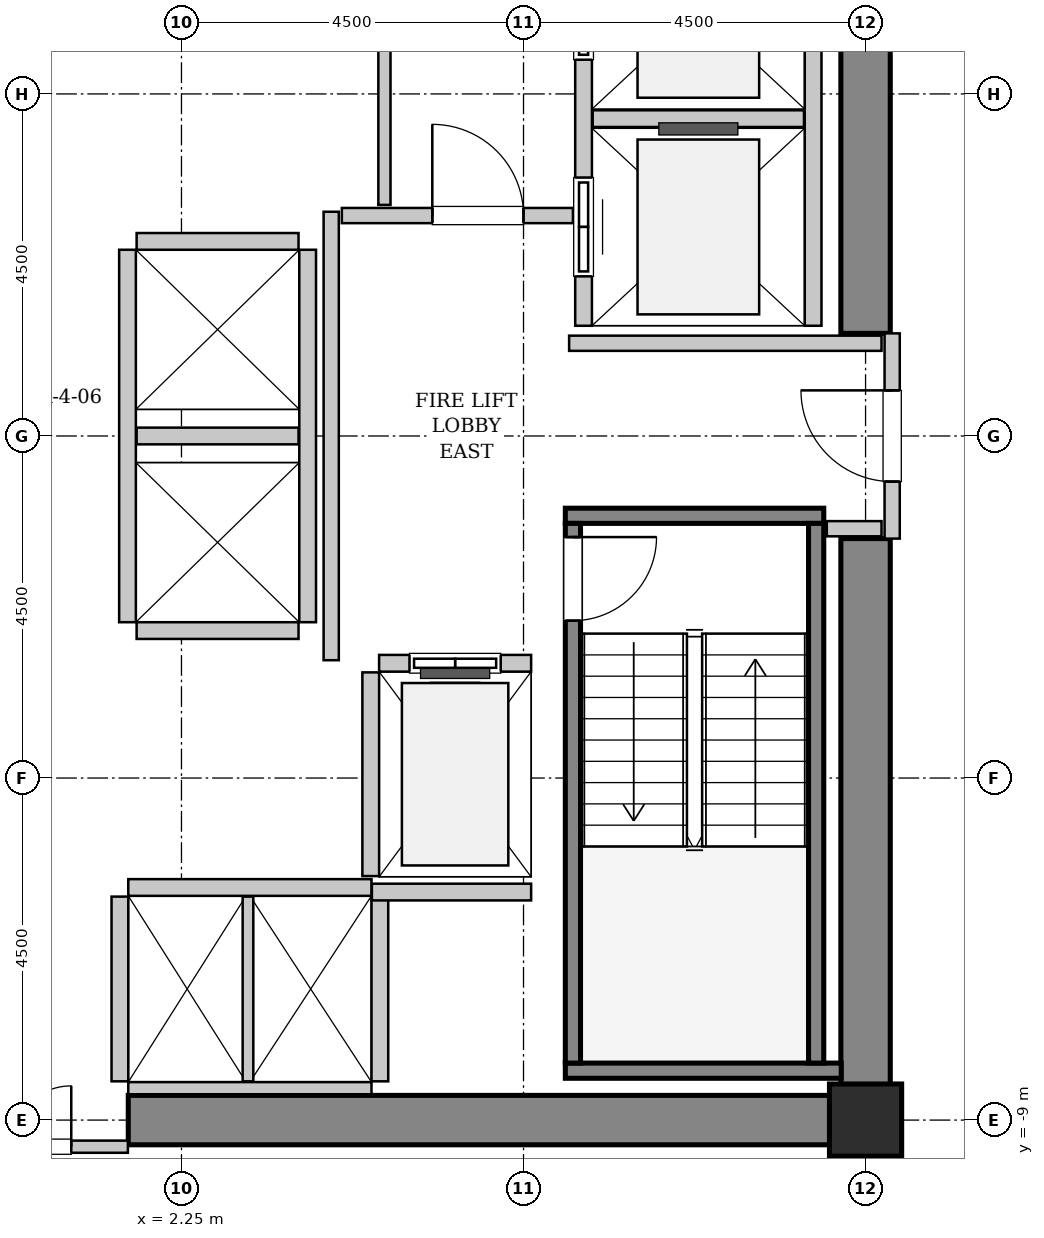
"""IFC4 building model, lengths in metres.
Left out: names, types, materials, properties, quantities, classifications, styles, units other than length and angle.
Written with IfcOpenShell. Run it as: python <this file> out.ifc"""

import sys

from ifc_helpers import new_model, si_unit, direction, frame, frame_2d, origin, origin_2d, place, context, subcontext, project, spatial, rectangle, hollow_rectangle, extrude, source, transform, mapped, element, fill, save


model = new_model("IFC4")
c1 = context("Model", 3, precision=1e-05, world=origin(), true_north=direction((0.0, 1.0)))
c2 = subcontext(c1, "Body", "Model", "MODEL_VIEW")
j1 = project(units=[si_unit("LENGTHUNIT", "METRE"), si_unit("PLANEANGLEUNIT", "RADIAN")], contexts=[c1])
p1 = place(None, origin())
s1 = spatial("IfcSite", under=j1, at=p1, CompositionType="ELEMENT")
p2 = place(p1, origin())
s2 = spatial("IfcBuilding", under=s1, at=p2, CompositionType="ELEMENT")
p3 = place(p2, frame((0.0, 0.0, 33.0)))
s3 = spatial("IfcBuildingStorey", under=s2, at=p3, CompositionType="ELEMENT", Elevation=33.0)
m1 = source(origin(), c2, "Body", "SweptSolid", [
    extrude(rectangle(XDim=10.025, YDim=0.65, at=frame_2d((5.012, 0.0))), origin(), (0.0, 0.0, 1.0), 3.8),
])
p4 = place(p3, frame((1.55, -9.0, 0.0), z_axis=(0.0, 0.0, 1.0), x_axis=(1.0, 0.0, 0.0)))
e1 = element("IfcWall", 1, at=p4, inside=s3, PredefinedType="SHEAR", context=c2, shape_type="MappedRepresentation", body=[
    mapped(m1, transform((0.0, 0.0, 0.0), x_axis=(1.0, 0.0, 0.0), y_axis=(0.0, 1.0, 0.0), z_axis=(0.0, 0.0, 1.0), scale=1.0)),
])
m2 = source(origin(), c2, "Body", "SweptSolid", [
    extrude(rectangle(XDim=7.325, YDim=0.65, at=frame_2d((3.663, 0.0))), origin(), (0.0, 0.0, 1.0), 3.8),
])
for number, where, z_axis, x_axis in (
    (2, (11.25, -8.675, 0.0), (0.0, 0.0, 1.0), (0.0, 1.0, 0.0)),
    (3, (11.25, 1.35, 0.0), (0.0, 0.0, 1.0), (0.0, 1.0, 0.0)),
):
    element("IfcWall", number, at=place(p3, frame(where, z_axis=z_axis, x_axis=x_axis)), inside=s3, PredefinedType="SHEAR", context=c2, shape_type="MappedRepresentation", body=[
        mapped(m2, transform((0.0, 0.0, 0.0), x_axis=(1.0, 0.0, 0.0), y_axis=(0.0, 1.0, 0.0), z_axis=(0.0, 0.0, 1.0), scale=1.0)),
    ])
m3 = source(origin(), c2, "Body", "SweptSolid", [
    extrude(hollow_rectangle(XDim=0.95, YDim=0.95, WallThickness=0.045, InnerFilletRadius=0.045, OuterFilletRadius=0.09, at=origin_2d()), origin(), (0.0, 0.0, 1.0), 3.8),
])
p5 = place(p3, frame((11.25, -9.0, 0.0), z_axis=(0.0, 0.0, 1.0), x_axis=(1.0, 0.0, 0.0)))
e4 = element("IfcColumn", 4, at=p5, inside=s3, PredefinedType="COLUMN", context=c2, shape_type="MappedRepresentation", body=[
    mapped(m3, transform((0.0, 0.0, 0.0), x_axis=(1.0, 0.0, 0.0), y_axis=(0.0, 1.0, 0.0), z_axis=(0.0, 0.0, 1.0), scale=1.0)),
])
m4 = source(origin(), c2, "Body", "SweptSolid", [
    extrude(rectangle(XDim=3.4, YDim=0.2, at=frame_2d((1.7, 0.0))), origin(), (0.0, 0.0, 1.0), 3.8),
])
p6 = place(p3, frame((7.3, -1.05, 0.0), z_axis=(0.0, 0.0, 1.0), x_axis=(1.0, 0.0, 0.0)))
e5 = element("IfcWall", 5, at=p6, inside=s3, PredefinedType="SOLIDWALL", context=c2, shape_type="MappedRepresentation", body=[
    mapped(m4, transform((0.0, 0.0, 0.0), x_axis=(1.0, 0.0, 0.0), y_axis=(0.0, 1.0, 0.0), z_axis=(0.0, 0.0, 1.0), scale=1.0)),
])
m5 = source(origin(), c2, "Body", "SweptSolid", [
    extrude(rectangle(XDim=3.63, YDim=0.2, at=frame_2d((1.815, 0.0))), origin(), (0.0, 0.0, 1.0), 3.8),
])
p7 = place(p3, frame((7.3, -8.35, 0.0), z_axis=(0.0, 0.0, 1.0), x_axis=(1.0, 0.0, 0.0)))
e6 = element("IfcWall", 6, at=p7, inside=s3, PredefinedType="SOLIDWALL", context=c2, shape_type="MappedRepresentation", body=[
    mapped(m5, transform((0.0, 0.0, 0.0), x_axis=(1.0, 0.0, 0.0), y_axis=(0.0, 1.0, 0.0), z_axis=(0.0, 0.0, 1.0), scale=1.0)),
])
m6 = source(origin(), c2, "Body", "SweptSolid", [
    extrude(rectangle(XDim=7.1, YDim=0.2, at=frame_2d((3.55, 0.0))), origin(), (0.0, 0.0, 1.0), 3.8),
])
p8 = place(p3, frame((7.4, -1.15, 0.0), z_axis=(0.0, 0.0, 1.0), x_axis=(0.0, -1.0, 0.0)))
e7 = element("IfcWall", 7, at=p8, inside=s3, PredefinedType="SOLIDWALL", context=c2, shape_type="MappedRepresentation", body=[
    mapped(m6, transform((0.0, 0.0, 0.0), x_axis=(1.0, 0.0, 0.0), y_axis=(0.0, 1.0, 0.0), z_axis=(0.0, 0.0, 1.0), scale=1.0)),
])
p9 = place(p8, frame((0.18, 0.0, 0.0)))
e8 = element("IfcOpeningElement", 8, at=p9, cuts=e7, PredefinedType="OPENING", context=c2, shape_type="SweptSolid", body=[
    extrude(rectangle(XDim=1.1, YDim=2.15, at=frame_2d((0.55, 1.075))), frame((0.0, 0.11, 0.0), z_axis=(0.0, -1.0, 0.0), x_axis=(1.0, 0.0, 0.0)), (0.0, 0.0, 1.0), 0.22),
])
p10 = place(p3, frame((10.6, -1.15, 0.0), z_axis=(0.0, 0.0, 1.0), x_axis=(0.0, -1.0, 0.0)))
e9 = element("IfcWall", 9, at=p10, inside=s3, PredefinedType="SOLIDWALL", context=c2, shape_type="MappedRepresentation", body=[
    mapped(m6, transform((0.0, 0.0, 0.0), x_axis=(1.0, 0.0, 0.0), y_axis=(0.0, 1.0, 0.0), z_axis=(0.0, 0.0, 1.0), scale=1.0)),
])
m7 = source(origin(), c2, "Body", "SweptSolid", [
    extrude(rectangle(XDim=2.0, YDim=0.22, at=frame_2d((1.0, 0.0))), origin(), (0.0, 0.0, 1.0), 3.535),
])
p11 = place(p3, frame((6.85, -2.99, 0.0), z_axis=(0.0, 0.0, 1.0), x_axis=(-1.0, 0.0, 0.0)))
e10 = element("IfcWall", 10, at=p11, inside=s3, PredefinedType="SOLIDWALL", context=c2, shape_type="MappedRepresentation", body=[
    mapped(m7, transform((0.0, 0.0, 0.0), x_axis=(1.0, 0.0, 0.0), y_axis=(0.0, 1.0, 0.0), z_axis=(0.0, 0.0, 1.0), scale=1.0)),
])
p12 = place(p11, frame((0.4, 0.0, 0.0)))
e11 = element("IfcOpeningElement", 11, at=p12, cuts=e10, PredefinedType="OPENING", context=c2, shape_type="SweptSolid", body=[
    extrude(rectangle(XDim=1.2, YDim=2.2, at=frame_2d((0.6, 1.1))), frame((0.0, 0.12, 0.0), z_axis=(0.0, -1.0, 0.0), x_axis=(1.0, 0.0, 0.0)), (0.0, 0.0, 1.0), 0.24),
])
m8 = source(origin(), c2, "Body", "SweptSolid", [
    extrude(rectangle(XDim=2.68, YDim=0.22, at=frame_2d((1.34, 0.0))), origin(), (0.0, 0.0, 1.0), 3.535),
])
p13 = place(p3, frame((4.74, -3.11, 0.0), z_axis=(0.0, 0.0, 1.0), x_axis=(0.0, -1.0, 0.0)))
e12 = element("IfcWall", 12, at=p13, inside=s3, PredefinedType="SOLIDWALL", context=c2, shape_type="MappedRepresentation", body=[
    mapped(m8, transform((0.0, 0.0, 0.0), x_axis=(1.0, 0.0, 0.0), y_axis=(0.0, 1.0, 0.0), z_axis=(0.0, 0.0, 1.0), scale=1.0)),
])
m9 = source(origin(), c2, "Body", "SweptSolid", [
    extrude(rectangle(XDim=5.45, YDim=0.22, at=frame_2d((2.725, 0.0))), origin(), (0.0, 0.0, 1.0), 3.535),
])
p14 = place(p3, frame((7.54, 6.9, 0.0), z_axis=(0.0, 0.0, 1.0), x_axis=(0.0, -1.0, 0.0)))
e13 = element("IfcWall", 13, at=p14, inside=s3, PredefinedType="SOLIDWALL", context=c2, shape_type="MappedRepresentation", body=[
    mapped(m9, transform((0.0, 0.0, 0.0), x_axis=(1.0, 0.0, 0.0), y_axis=(0.0, 1.0, 0.0), z_axis=(0.0, 0.0, 1.0), scale=1.0)),
])
p15 = place(p14, frame((3.5, 0.0, 0.0)))
e14 = element("IfcOpeningElement", 14, at=p15, cuts=e13, PredefinedType="OPENING", context=c2, shape_type="SweptSolid", body=[
    extrude(rectangle(XDim=1.3, YDim=2.3, at=frame_2d((0.65, 1.15))), frame((0.0, 0.12, 0.0), z_axis=(0.0, -1.0, 0.0), x_axis=(1.0, 0.0, 0.0)), (0.0, 0.0, 1.0), 0.24),
])
p16 = place(p14, frame((0.65, 0.0, 0.0)))
e15 = element("IfcOpeningElement", 15, at=p16, cuts=e13, PredefinedType="OPENING", context=c2, shape_type="SweptSolid", body=[
    extrude(rectangle(XDim=1.3, YDim=2.3, at=frame_2d((0.65, 1.15))), frame((0.0, 0.12, 0.0), z_axis=(0.0, -1.0, 0.0), x_axis=(1.0, 0.0, 0.0)), (0.0, 0.0, 1.0), 0.24),
])
p17 = place(p3, frame((10.56, 1.45, 0.0), z_axis=(0.0, 0.0, 1.0), x_axis=(0.0, 1.0, 0.0)))
e16 = element("IfcWall", 16, at=p17, inside=s3, PredefinedType="SOLIDWALL", context=c2, shape_type="MappedRepresentation", body=[
    mapped(m9, transform((0.0, 0.0, 0.0), x_axis=(1.0, 0.0, 0.0), y_axis=(0.0, 1.0, 0.0), z_axis=(0.0, 0.0, 1.0), scale=1.0)),
])
m10 = source(origin(), c2, "Body", "SweptSolid", [
    extrude(rectangle(XDim=2.78, YDim=0.22, at=frame_2d((1.39, 0.0))), origin(), (0.0, 0.0, 1.0), 3.535),
])
p18 = place(p3, frame((7.66, 4.175, 0.0), z_axis=(0.0, 0.0, 1.0), x_axis=(1.0, 0.0, 0.0)))
e17 = element("IfcWall", 17, at=p18, inside=s3, PredefinedType="SOLIDWALL", context=c2, shape_type="MappedRepresentation", body=[
    mapped(m10, transform((0.0, 0.0, 0.0), x_axis=(1.0, 0.0, 0.0), y_axis=(0.0, 1.0, 0.0), z_axis=(0.0, 0.0, 1.0), scale=1.0)),
])
m11 = source(origin(), c2, "Body", "SweptSolid", [
    extrude(rectangle(XDim=3.2, YDim=0.22, at=frame_2d((1.6, 0.0))), origin(), (0.0, 0.0, 1.0), 3.535),
])
p19 = place(p3, frame((4.75, -5.94, 0.0), z_axis=(0.0, 0.0, 1.0), x_axis=(-1.0, 0.0, 0.0)))
e18 = element("IfcWall", 18, at=p19, inside=s3, PredefinedType="SOLIDWALL", context=c2, shape_type="MappedRepresentation", body=[
    mapped(m11, transform((0.0, 0.0, 0.0), x_axis=(1.0, 0.0, 0.0), y_axis=(0.0, 1.0, 0.0), z_axis=(0.0, 0.0, 1.0), scale=1.0)),
])
m12 = source(origin(), c2, "Body", "SweptSolid", [
    extrude(rectangle(XDim=3.2, YDim=0.16, at=frame_2d((1.6, 0.0))), origin(), (0.0, 0.0, 1.0), 2.425),
])
p20 = place(p3, frame((1.55, -8.58, 0.0), z_axis=(0.0, 0.0, 1.0), x_axis=(1.0, 0.0, 0.0)))
e19 = element("IfcWall", 19, at=p20, inside=s3, PredefinedType="PARTITIONING", context=c2, shape_type="MappedRepresentation", body=[
    mapped(m12, transform((0.0, 0.0, 0.0), x_axis=(1.0, 0.0, 0.0), y_axis=(0.0, 1.0, 0.0), z_axis=(0.0, 0.0, 1.0), scale=1.0)),
])
m13 = source(origin(), c2, "Body", "SweptSolid", [
    extrude(rectangle(XDim=2.43, YDim=0.22, at=frame_2d((1.215, 0.0))), origin(), (0.0, 0.0, 1.0), 3.535),
])
p21 = place(p3, frame((1.44, -6.06, 0.0), z_axis=(0.0, 0.0, 1.0), x_axis=(0.0, -1.0, 0.0)))
e20 = element("IfcWall", 20, at=p21, inside=s3, PredefinedType="SOLIDWALL", context=c2, shape_type="MappedRepresentation", body=[
    mapped(m13, transform((0.0, 0.0, 0.0), x_axis=(1.0, 0.0, 0.0), y_axis=(0.0, 1.0, 0.0), z_axis=(0.0, 0.0, 1.0), scale=1.0)),
])
m14 = source(origin(), c2, "Body", "SweptSolid", [
    extrude(rectangle(XDim=2.43, YDim=0.14, at=frame_2d((1.215, 0.0))), origin(), (0.0, 0.0, 1.0), 3.535),
])
p22 = place(p3, frame((3.125, -8.49, 0.0), z_axis=(0.0, 0.0, 1.0), x_axis=(0.0, 1.0, 0.0)))
e21 = element("IfcWall", 21, at=p22, inside=s3, PredefinedType="PARTITIONING", context=c2, shape_type="MappedRepresentation", body=[
    mapped(m14, transform((0.0, 0.0, 0.0), x_axis=(1.0, 0.0, 0.0), y_axis=(0.0, 1.0, 0.0), z_axis=(0.0, 0.0, 1.0), scale=1.0)),
])
p23 = place(p3, frame((4.86, -8.49, 0.0), z_axis=(0.0, 0.0, 1.0), x_axis=(0.0, 1.0, 0.0)))
e22 = element("IfcWall", 22, at=p23, inside=s3, PredefinedType="SOLIDWALL", context=c2, shape_type="MappedRepresentation", body=[
    mapped(m13, transform((0.0, 0.0, 0.0), x_axis=(1.0, 0.0, 0.0), y_axis=(0.0, 1.0, 0.0), z_axis=(0.0, 0.0, 1.0), scale=1.0)),
])
m15 = source(origin(), c2, "Body", "SweptSolid", [
    extrude(rectangle(XDim=4.9, YDim=0.22, at=frame_2d((2.45, 0.0))), origin(), (0.0, 0.0, 1.0), 3.535),
])
for number, where, z_axis, x_axis in (
    (23, (1.54, 2.45, 0.0), (0.0, 0.0, 1.0), (0.0, -1.0, 0.0)),
    (24, (3.91, -2.45, 0.0), (0.0, 0.0, 1.0), (0.0, 1.0, 0.0)),
):
    element("IfcWall", number, at=place(p3, frame(where, z_axis=z_axis, x_axis=x_axis)), inside=s3, PredefinedType="SOLIDWALL", context=c2, shape_type="MappedRepresentation", body=[
        mapped(m15, transform((0.0, 0.0, 0.0), x_axis=(1.0, 0.0, 0.0), y_axis=(0.0, 1.0, 0.0), z_axis=(0.0, 0.0, 1.0), scale=1.0)),
    ])
m16 = source(origin(), c2, "Body", "SweptSolid", [
    extrude(rectangle(XDim=2.13, YDim=0.22, at=frame_2d((1.065, 0.0))), origin(), (0.0, 0.0, 1.0), 3.535),
])
for number, where, z_axis, x_axis in (
    (25, (1.66, -2.56, 0.0), (0.0, 0.0, 1.0), (1.0, 0.0, 0.0)),
    (26, (1.66, 0.0, 0.0), (0.0, 0.0, 1.0), (1.0, 0.0, 0.0)),
    (27, (3.79, 2.56, 0.0), (0.0, 0.0, 1.0), (-1.0, 0.0, 0.0)),
):
    element("IfcWall", number, at=place(p3, frame(where, z_axis=z_axis, x_axis=x_axis)), inside=s3, PredefinedType="SOLIDWALL", context=c2, shape_type="MappedRepresentation", body=[
        mapped(m16, transform((0.0, 0.0, 0.0), x_axis=(1.0, 0.0, 0.0), y_axis=(0.0, 1.0, 0.0), z_axis=(0.0, 0.0, 1.0), scale=1.0)),
    ])
m17 = source(origin(), c2, "Body", "SweptSolid", [
    extrude(rectangle(XDim=2.095, YDim=0.22, at=frame_2d((1.048, 0.0))), origin(), (0.0, 0.0, 1.0), 3.535),
])
p24 = place(p3, frame((4.755, -6.0, 0.0), z_axis=(0.0, 0.0, 1.0), x_axis=(1.0, 0.0, 0.0)))
e28 = element("IfcWall", 28, at=p24, inside=s3, PredefinedType="SOLIDWALL", context=c2, shape_type="MappedRepresentation", body=[
    mapped(m17, transform((0.0, 0.0, 0.0), x_axis=(1.0, 0.0, 0.0), y_axis=(0.0, 1.0, 0.0), z_axis=(0.0, 0.0, 1.0), scale=1.0)),
])
m18 = source(origin(), c2, "Body", "SweptSolid", [
    extrude(rectangle(XDim=2.7, YDim=0.2, at=frame_2d((1.35, 0.0))), origin(), (0.0, 0.0, 1.0), 2.425),
])
p25 = place(p3, frame((11.6, -1.35, 0.0), z_axis=(0.0, 0.0, 1.0), x_axis=(0.0, 1.0, 0.0)))
e29 = element("IfcWall", 29, at=p25, inside=s3, PredefinedType="PARTITIONING", context=c2, shape_type="MappedRepresentation", body=[
    mapped(m18, transform((0.0, 0.0, 0.0), x_axis=(1.0, 0.0, 0.0), y_axis=(0.0, 1.0, 0.0), z_axis=(0.0, 0.0, 1.0), scale=1.0)),
])
p26 = place(p25, frame((0.75, 0.0, 0.0)))
e30 = element("IfcOpeningElement", 30, at=p26, cuts=e29, PredefinedType="OPENING", context=c2, shape_type="SweptSolid", body=[
    extrude(rectangle(XDim=1.2, YDim=2.15, at=frame_2d((0.6, 1.075))), frame((0.0, 0.11, 0.0), z_axis=(0.0, -1.0, 0.0), x_axis=(1.0, 0.0, 0.0)), (0.0, 0.0, 1.0), 0.22),
])
m19 = source(origin(), c2, "Body", "SweptSolid", [
    extrude(rectangle(XDim=5.9, YDim=0.2, at=frame_2d((2.95, 0.0))), origin(), (0.0, 0.0, 1.0), 3.535),
])
p27 = place(p3, frame((4.22, -2.95, 0.0), z_axis=(0.0, 0.0, 1.0), x_axis=(0.0, 1.0, 0.0)))
e31 = element("IfcWall", 31, at=p27, inside=s3, PredefinedType="PARTITIONING", context=c2, shape_type="MappedRepresentation", body=[
    mapped(m19, transform((0.0, 0.0, 0.0), x_axis=(1.0, 0.0, 0.0), y_axis=(0.0, 1.0, 0.0), z_axis=(0.0, 0.0, 1.0), scale=1.0)),
])
m20 = source(origin(), c2, "Body", "SweptSolid", [
    extrude(rectangle(XDim=3.04, YDim=0.2, at=frame_2d((1.52, 0.0))), origin(), (0.0, 0.0, 1.0), 3.535),
])
p28 = place(p3, frame((4.36, 2.9, 0.0), z_axis=(0.0, 0.0, 1.0), x_axis=(1.0, 0.0, 0.0)))
e32 = element("IfcWall", 32, at=p28, inside=s3, PredefinedType="PARTITIONING", context=c2, shape_type="MappedRepresentation", body=[
    mapped(m20, transform((0.0, 0.0, 0.0), x_axis=(1.0, 0.0, 0.0), y_axis=(0.0, 1.0, 0.0), z_axis=(0.0, 0.0, 1.0), scale=1.0)),
])
p29 = place(p28, frame((1.19, 0.0, 0.0)))
e33 = element("IfcOpeningElement", 33, at=p29, cuts=e32, PredefinedType="OPENING", context=c2, shape_type="SweptSolid", body=[
    extrude(rectangle(XDim=1.2, YDim=2.15, at=frame_2d((0.6, 1.075))), frame((0.0, 0.11, 0.0), z_axis=(0.0, -1.0, 0.0), x_axis=(1.0, 0.0, 0.0)), (0.0, 0.0, 1.0), 0.22),
])
m21 = source(origin(), c2, "Body", "SweptSolid", [
    extrude(rectangle(XDim=4.11, YDim=0.2, at=frame_2d((2.055, 0.0))), origin(), (0.0, 0.0, 1.0), 3.535),
])
p30 = place(p3, frame((7.35, 1.22, 0.0), z_axis=(0.0, 0.0, 1.0), x_axis=(1.0, 0.0, 0.0)))
e34 = element("IfcWall", 34, at=p30, inside=s3, PredefinedType="PARTITIONING", context=c2, shape_type="MappedRepresentation", body=[
    mapped(m21, transform((0.0, 0.0, 0.0), x_axis=(1.0, 0.0, 0.0), y_axis=(0.0, 1.0, 0.0), z_axis=(0.0, 0.0, 1.0), scale=1.0)),
])
m22 = source(origin(), c2, "Body", "SweptSolid", [
    extrude(rectangle(XDim=0.72, YDim=0.2, at=frame_2d((0.36, 0.0))), origin(), (0.0, 0.0, 1.0), 3.535),
])
p31 = place(p3, frame((10.74, -1.22, 0.0), z_axis=(0.0, 0.0, 1.0), x_axis=(1.0, 0.0, 0.0)))
e35 = element("IfcWall", 35, at=p31, inside=s3, PredefinedType="PARTITIONING", context=c2, shape_type="MappedRepresentation", body=[
    mapped(m22, transform((0.0, 0.0, 0.0), x_axis=(1.0, 0.0, 0.0), y_axis=(0.0, 1.0, 0.0), z_axis=(0.0, 0.0, 1.0), scale=1.0)),
])
m23 = source(origin(), c2, "Body", "SweptSolid", [
    extrude(rectangle(XDim=3.09, YDim=0.16, at=frame_2d((1.545, 0.0))), origin(), (0.0, 0.0, 1.0), 2.425),
])
p32 = place(p3, frame((-1.545, -9.35, 0.0), z_axis=(0.0, 0.0, 1.0), x_axis=(1.0, 0.0, 0.0)))
e36 = element("IfcWall", 36, at=p32, inside=s3, PredefinedType="PARTITIONING", context=c2, shape_type="MappedRepresentation", body=[
    mapped(m23, transform((0.0, 0.0, 0.0), x_axis=(1.0, 0.0, 0.0), y_axis=(0.0, 1.0, 0.0), z_axis=(0.0, 0.0, 1.0), scale=1.0)),
])
p33 = place(p32, frame((0.745, 0.0, 0.0)))
e37 = element("IfcOpeningElement", 37, at=p33, cuts=e36, PredefinedType="OPENING", context=c2, shape_type="SweptSolid", body=[
    extrude(rectangle(XDim=1.6, YDim=2.3, at=frame_2d((0.8, 1.15))), frame((0.0, 0.09, 0.0), z_axis=(0.0, -1.0, 0.0), x_axis=(1.0, 0.0, 0.0)), (0.0, 0.0, 1.0), 0.18),
])
m24 = source(origin(), c2, "Body", "SweptSolid", [
    extrude(rectangle(XDim=3.015, YDim=0.16, at=frame_2d((1.507, 0.0))), origin(), (0.0, 0.0, 1.0), 3.535),
])
p34 = place(p3, frame((4.92, 3.04, 0.0), z_axis=(0.0, 0.0, 1.0), x_axis=(0.0, 1.0, 0.0)))
e38 = element("IfcWall", 38, at=p34, inside=s3, PredefinedType="PARTITIONING", context=c2, shape_type="MappedRepresentation", body=[
    mapped(m24, transform((0.0, 0.0, 0.0), x_axis=(1.0, 0.0, 0.0), y_axis=(0.0, 1.0, 0.0), z_axis=(0.0, 0.0, 1.0), scale=1.0)),
])
m25 = source(origin(), c2, "Body", "SweptSolid", [
    extrude(rectangle(XDim=1.1, YDim=2.15, at=frame_2d((0.55, 1.075))), frame((0.0, 0.025, 0.0), z_axis=(0.0, -1.0, 0.0), x_axis=(1.0, 0.0, 0.0)), (0.0, 0.0, 1.0), 0.05),
])
p35 = place(p9, origin())
e39 = element("IfcDoor", 39, at=p35, inside=s3, OperationType="SINGLE_SWING_LEFT", PredefinedType="DOOR", context=c2, shape_type="MappedRepresentation", body=[
    mapped(m25, transform((0.0, 0.0, 0.0), x_axis=(1.0, 0.0, 0.0), y_axis=(0.0, 1.0, 0.0), z_axis=(0.0, 0.0, 1.0), scale=1.0)),
])
fill(e8, e39)
m26 = source(origin(), c2, "Body", "SweptSolid", [
    extrude(rectangle(XDim=1.2, YDim=2.2, at=frame_2d((0.6, 1.1))), frame((0.0, 0.025, 0.0), z_axis=(0.0, -1.0, 0.0), x_axis=(1.0, 0.0, 0.0)), (0.0, 0.0, 1.0), 0.05),
])
p36 = place(p12, origin())
e40 = element("IfcDoor", 40, at=p36, inside=s3, OperationType="SLIDING_TO_LEFT", PredefinedType="DOOR", context=c2, shape_type="MappedRepresentation", body=[
    mapped(m26, transform((0.0, 0.0, 0.0), x_axis=(1.0, 0.0, 0.0), y_axis=(0.0, 1.0, 0.0), z_axis=(0.0, 0.0, 1.0), scale=1.0)),
])
fill(e11, e40)
m27 = source(origin(), c2, "Body", "SweptSolid", [
    extrude(rectangle(XDim=1.3, YDim=2.3, at=frame_2d((0.65, 1.15))), frame((0.0, 0.025, 0.0), z_axis=(0.0, -1.0, 0.0), x_axis=(1.0, 0.0, 0.0)), (0.0, 0.0, 1.0), 0.05),
])
p37 = place(p15, origin())
e41 = element("IfcDoor", 41, at=p37, inside=s3, OperationType="SLIDING_TO_RIGHT", PredefinedType="DOOR", context=c2, shape_type="MappedRepresentation", body=[
    mapped(m27, transform((0.0, 0.0, 0.0), x_axis=(1.0, 0.0, 0.0), y_axis=(0.0, 1.0, 0.0), z_axis=(0.0, 0.0, 1.0), scale=1.0)),
])
fill(e14, e41)
p38 = place(p16, origin())
e42 = element("IfcDoor", 42, at=p38, inside=s3, OperationType="SLIDING_TO_RIGHT", PredefinedType="DOOR", context=c2, shape_type="MappedRepresentation", body=[
    mapped(m27, transform((0.0, 0.0, 0.0), x_axis=(1.0, 0.0, 0.0), y_axis=(0.0, 1.0, 0.0), z_axis=(0.0, 0.0, 1.0), scale=1.0)),
])
fill(e15, e42)
m28 = source(origin(), c2, "Body", "SweptSolid", [
    extrude(rectangle(XDim=1.2, YDim=2.15, at=frame_2d((0.6, 1.075))), frame((0.0, 0.025, 0.0), z_axis=(0.0, -1.0, 0.0), x_axis=(1.0, 0.0, 0.0)), (0.0, 0.0, 1.0), 0.05),
])
p39 = place(p26, origin())
e43 = element("IfcDoor", 43, at=p39, inside=s3, OperationType="SINGLE_SWING_RIGHT", PredefinedType="DOOR", context=c2, shape_type="MappedRepresentation", body=[
    mapped(m28, transform((0.0, 0.0, 0.0), x_axis=(1.0, 0.0, 0.0), y_axis=(0.0, 1.0, 0.0), z_axis=(0.0, 0.0, 1.0), scale=1.0)),
])
fill(e30, e43)
p40 = place(p29, origin())
e44 = element("IfcDoor", 44, at=p40, inside=s3, OperationType="SINGLE_SWING_LEFT", PredefinedType="DOOR", context=c2, shape_type="MappedRepresentation", body=[
    mapped(m28, transform((0.0, 0.0, 0.0), x_axis=(1.0, 0.0, 0.0), y_axis=(0.0, 1.0, 0.0), z_axis=(0.0, 0.0, 1.0), scale=1.0)),
])
fill(e33, e44)
m29 = source(origin(), c2, "Body", "SweptSolid", [
    extrude(rectangle(XDim=1.6, YDim=2.3, at=frame_2d((0.8, 1.15))), frame((0.0, 0.025, 0.0), z_axis=(0.0, -1.0, 0.0), x_axis=(1.0, 0.0, 0.0)), (0.0, 0.0, 1.0), 0.05),
])
p41 = place(p33, origin())
e45 = element("IfcDoor", 45, at=p41, inside=s3, OperationType="DOUBLE_DOOR_SINGLE_SWING", PredefinedType="DOOR", context=c2, shape_type="MappedRepresentation", body=[
    mapped(m29, transform((0.0, 0.0, 0.0), x_axis=(1.0, 0.0, 0.0), y_axis=(0.0, 1.0, 0.0), z_axis=(0.0, 0.0, 1.0), scale=1.0)),
])
fill(e37, e45)
save(model, sys.argv[1])
